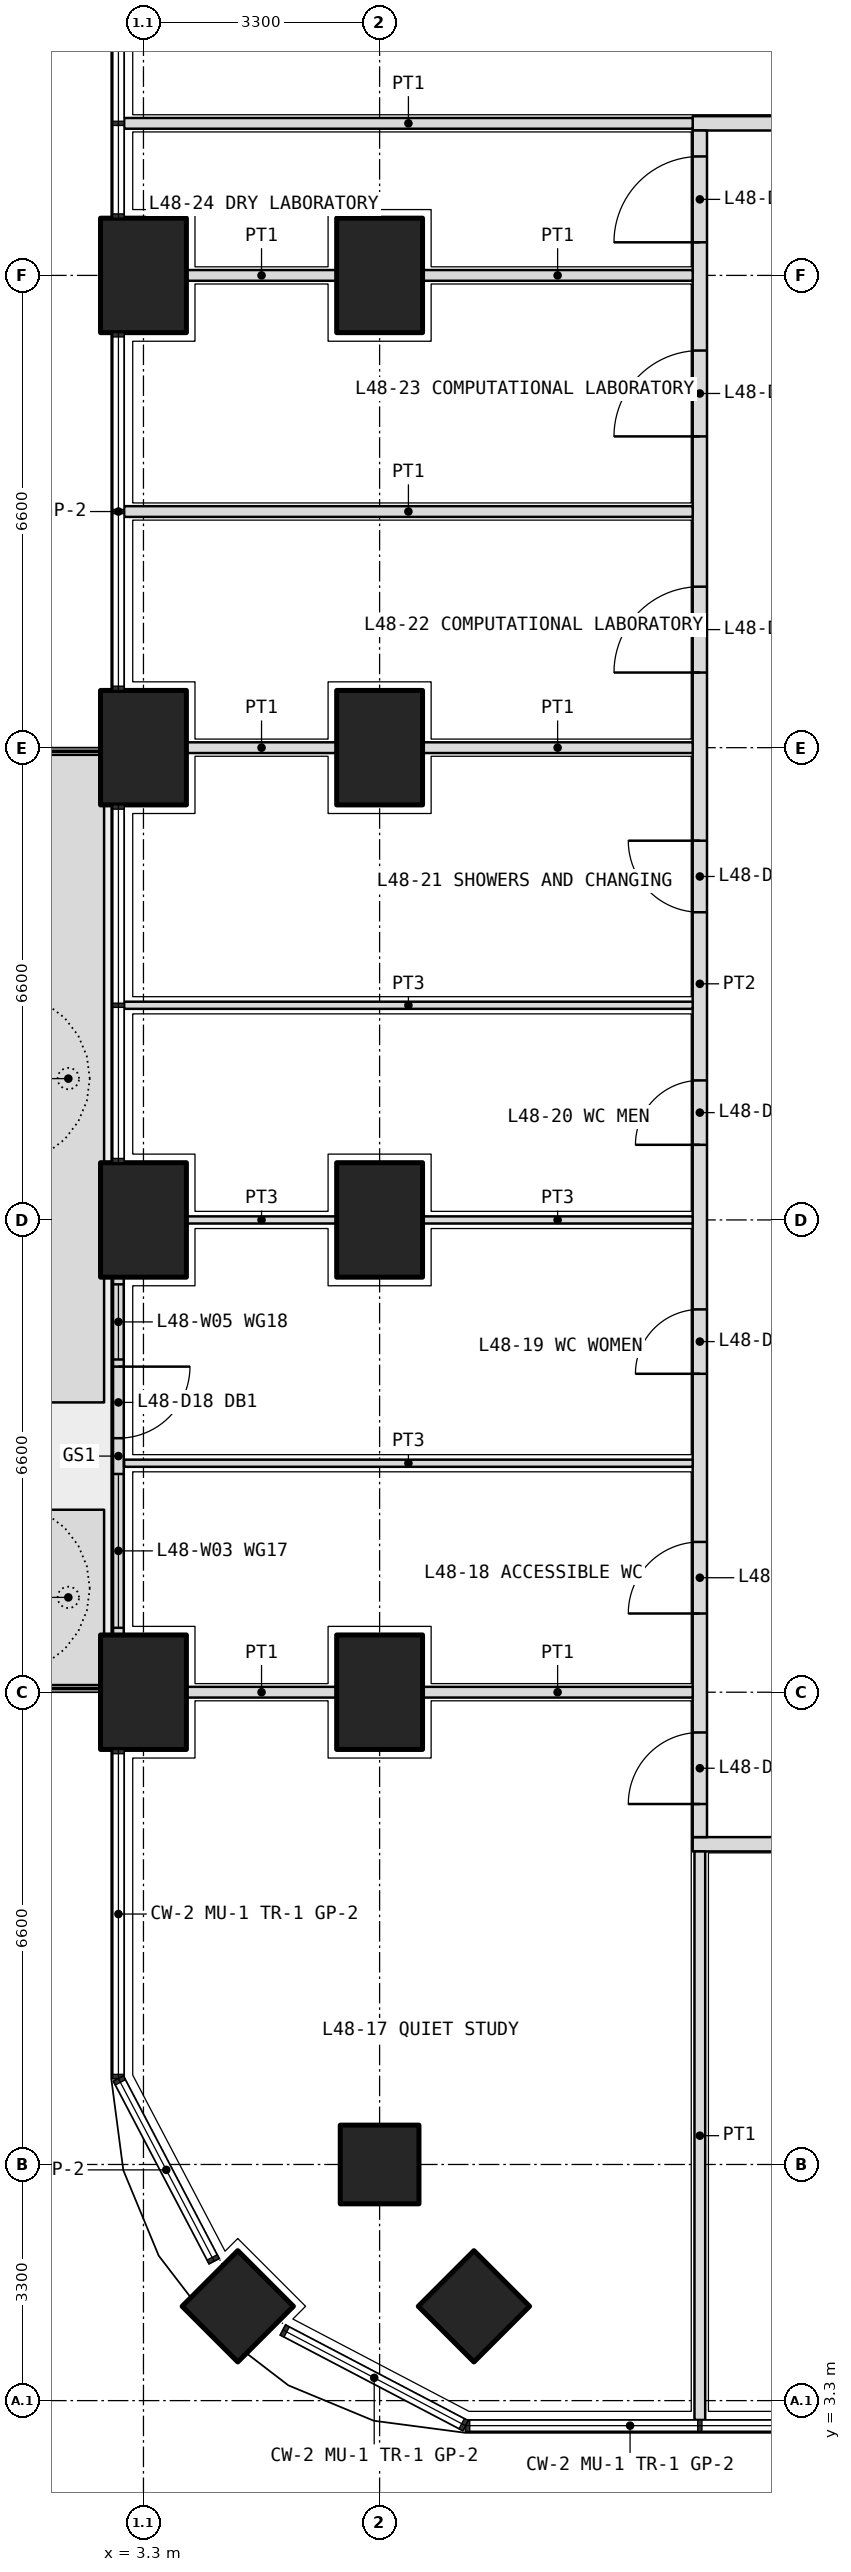
"""IFC4 building model, lengths in metres.
Left out: names, types, materials, properties, quantities, classifications, styles, units other than length and angle.
Written with IfcOpenShell. Run it as: python <this file> out.ifc"""

import sys

from ifc_helpers import new_model, si_unit, direction, frame, frame_2d, origin, origin_2d, place, context, subcontext, project, spatial, polyline, rectangle, outline, extrude, element, fill, save


model = new_model("IFC4")
c1 = context("Model", 3, precision=1e-05, world=origin(), true_north=direction((0.0, 1.0)))
c2 = subcontext(c1, "Body", "Model", "MODEL_VIEW")
j1 = project(units=[si_unit("LENGTHUNIT", "METRE"), si_unit("PLANEANGLEUNIT", "RADIAN")], contexts=[c1])
p1 = place(None, origin())
s1 = spatial("IfcSite", under=j1, at=p1, CompositionType="ELEMENT")
p2 = place(p1, origin())
s2 = spatial("IfcBuilding", under=s1, at=p2, CompositionType="ELEMENT")
p3 = place(p2, frame((0.0, 0.0, 210.3)))
s3 = spatial("IfcBuildingStorey", under=s2, at=p3, CompositionType="ELEMENT", Elevation=210.3)
p4 = place(p3, frame((4.618, 4.618, 0.0), z_axis=(0.0, 0.0, 1.0), x_axis=(0.707106781187, 0.707106781187, 0.0)))
e1 = element("IfcColumn", 1, at=p4, inside=s3, PredefinedType="COLUMN", context=c2, shape_type="SweptSolid", body=[
    extrude(rectangle(XDim=1.1, YDim=1.1, at=origin_2d()), origin(), (0.0, 0.0, 1.0), 4.2),
])
for number, where, z_axis, x_axis in (
    (2, (3.3, 13.2, 0.0), (0.0, 0.0, 1.0), (0.0, 1.0, 0.0)),
    (3, (3.3, 19.8, 0.0), (0.0, 0.0, 1.0), (0.0, 1.0, 0.0)),
    (4, (3.3, 26.4, 0.0), (0.0, 0.0, 1.0), (0.0, 1.0, 0.0)),
    (5, (3.3, 33.0, 0.0), (0.0, 0.0, 1.0), (0.0, 1.0, 0.0)),
):
    element("IfcColumn", number, at=place(p3, frame(where, z_axis=z_axis, x_axis=x_axis)), inside=s3, PredefinedType="COLUMN", context=c2, shape_type="SweptSolid", body=[
        extrude(rectangle(XDim=1.6, YDim=1.2, at=origin_2d()), origin(), (0.0, 0.0, 1.0), 4.2),
    ])
for number, where, z_axis, x_axis in (
    (6, (6.6, 6.6, 0.0), (0.0, 0.0, 1.0), (1.0, 0.0, 0.0)),
    (7, (7.918, 4.618, 0.0), (0.0, 0.0, 1.0), (0.707, 0.707, 0.0)),
):
    element("IfcColumn", number, at=place(p3, frame(where, z_axis=z_axis, x_axis=x_axis)), inside=s3, PredefinedType="COLUMN", context=c2, shape_type="SweptSolid", body=[
        extrude(rectangle(XDim=1.1, YDim=1.1, at=origin_2d()), origin(), (0.0, 0.0, 1.0), 4.2),
    ])
for number, where, z_axis, x_axis in (
    (8, (6.6, 13.2, 0.0), (0.0, 0.0, 1.0), (0.0, 1.0, 0.0)),
    (9, (6.6, 19.8, 0.0), (0.0, 0.0, 1.0), (0.0, 1.0, 0.0)),
    (10, (6.6, 26.4, 0.0), (0.0, 0.0, 1.0), (0.0, 1.0, 0.0)),
    (11, (6.6, 33.0, 0.0), (0.0, 0.0, 1.0), (0.0, 1.0, 0.0)),
):
    element("IfcColumn", number, at=place(p3, frame(where, z_axis=z_axis, x_axis=x_axis)), inside=s3, PredefinedType="COLUMN", context=c2, shape_type="SweptSolid", body=[
        extrude(rectangle(XDim=1.6, YDim=1.2, at=origin_2d()), origin(), (0.0, 0.0, 1.0), 4.2),
    ])
p5 = place(p3, origin())
e12 = element("IfcWall", 12, at=p5, inside=s3, PredefinedType="USERDEFINED", context=c2, shape_type="SweptSolid", body=[
    extrude(outline(polyline([(1.75, 13.3), (2.75, 13.3), (2.75, 15.75), (1.75, 15.75), (1.75, 13.3)]), holes=[polyline([(1.9, 13.45), (2.6, 13.45), (2.6, 15.6), (1.9, 15.6), (1.9, 13.45)])]), origin(), (0.0, 0.0, 1.0), 1.05),
])
p6 = place(p3, origin())
e13 = element("IfcWall", 13, at=p6, inside=s3, PredefinedType="USERDEFINED", context=c2, shape_type="SweptSolid", body=[
    extrude(outline(polyline([(1.75, 17.25), (2.75, 17.25), (2.75, 26.3), (1.75, 26.3), (1.75, 17.25)]), holes=[polyline([(1.9, 17.4), (2.6, 17.4), (2.6, 26.15), (1.9, 26.15), (1.9, 17.4)])]), origin(), (0.0, 0.0, 1.0), 1.05),
])
p7 = place(p3, frame((2.95, 19.0, 0.0), z_axis=(0.0, 0.0, 1.0), x_axis=(0.0, -1.0, 0.0)))
e14 = element("IfcWall", 14, at=p7, inside=s3, PredefinedType="SOLIDWALL", context=c2, shape_type="SweptSolid", body=[
    extrude(rectangle(XDim=5.0, YDim=0.15, at=frame_2d((2.5, 0.0))), origin(), (0.0, 0.0, 1.0), 2.6),
])
p8 = place(p7, frame((1.25, 0.0, 0.0)))
e15 = element("IfcOpeningElement", 15, at=p8, cuts=e14, PredefinedType="OPENING", context=c2, shape_type="SweptSolid", body=[
    extrude(rectangle(XDim=1.0, YDim=2.4, at=frame_2d((0.5, 1.2))), frame((0.0, 0.085, 0.0), z_axis=(0.0, -1.0, 0.0), x_axis=(1.0, 0.0, 0.0)), (0.0, 0.0, 1.0), 0.17),
])
p9 = place(p7, frame((0.1, 0.0, 0.1)))
e16 = element("IfcOpeningElement", 16, at=p9, cuts=e14, PredefinedType="OPENING", context=c2, shape_type="SweptSolid", body=[
    extrude(rectangle(XDim=1.05, YDim=2.2, at=frame_2d((0.525, 1.1))), frame((0.0, 0.085, 0.0), z_axis=(0.0, -1.0, 0.0), x_axis=(1.0, 0.0, 0.0)), (0.0, 0.0, 1.0), 0.17),
])
p10 = place(p7, frame((2.75, 0.0, 0.1)))
e17 = element("IfcOpeningElement", 17, at=p10, cuts=e14, PredefinedType="OPENING", context=c2, shape_type="SweptSolid", body=[
    extrude(rectangle(XDim=2.15, YDim=2.2, at=frame_2d((1.075, 1.1))), frame((0.0, 0.085, 0.0), z_axis=(0.0, -1.0, 0.0), x_axis=(1.0, 0.0, 0.0)), (0.0, 0.0, 1.0), 0.17),
])
p11 = place(p3, frame((10.975, 11.075, 0.0), z_axis=(0.0, 0.0, 1.0), x_axis=(1.0, 0.0, 0.0)))
e18 = element("IfcWall", 18, at=p11, inside=s3, PredefinedType="PARTITIONING", context=c2, shape_type="SweptSolid", body=[
    extrude(rectangle(XDim=30.85, YDim=0.2, at=frame_2d((15.425, 0.0))), origin(), (0.0, 0.0, 1.0), 2.85),
])
p12 = place(p11, frame((2.312, 0.0, 0.0)))
e19 = element("IfcOpeningElement", 19, at=p12, cuts=e18, PredefinedType="OPENING", context=c2, shape_type="SweptSolid", body=[
    extrude(rectangle(XDim=1.0, YDim=2.1, at=frame_2d((0.5, 1.05))), frame((0.0, 0.11, 0.0), z_axis=(0.0, -1.0, 0.0), x_axis=(1.0, 0.0, 0.0)), (0.0, 0.0, 1.0), 0.22),
])
p13 = place(p11, frame((9.975, 0.0, 0.0)))
e20 = element("IfcOpeningElement", 20, at=p13, cuts=e18, PredefinedType="OPENING", context=c2, shape_type="SweptSolid", body=[
    extrude(rectangle(XDim=1.0, YDim=2.1, at=frame_2d((0.5, 1.05))), frame((0.0, 0.11, 0.0), z_axis=(0.0, -1.0, 0.0), x_axis=(1.0, 0.0, 0.0)), (0.0, 0.0, 1.0), 0.22),
])
p14 = place(p11, frame((16.575, 0.0, 0.0)))
e21 = element("IfcOpeningElement", 21, at=p14, cuts=e18, PredefinedType="OPENING", context=c2, shape_type="SweptSolid", body=[
    extrude(rectangle(XDim=1.0, YDim=2.1, at=frame_2d((0.5, 1.05))), frame((0.0, 0.11, 0.0), z_axis=(0.0, -1.0, 0.0), x_axis=(1.0, 0.0, 0.0)), (0.0, 0.0, 1.0), 0.22),
])
p15 = place(p11, frame((23.175, 0.0, 0.0)))
e22 = element("IfcOpeningElement", 22, at=p15, cuts=e18, PredefinedType="OPENING", context=c2, shape_type="SweptSolid", body=[
    extrude(rectangle(XDim=1.0, YDim=2.1, at=frame_2d((0.5, 1.05))), frame((0.0, 0.11, 0.0), z_axis=(0.0, -1.0, 0.0), x_axis=(1.0, 0.0, 0.0)), (0.0, 0.0, 1.0), 0.22),
])
p16 = place(p11, frame((29.188, 0.0, 0.0)))
e23 = element("IfcOpeningElement", 23, at=p16, cuts=e18, PredefinedType="OPENING", context=c2, shape_type="SweptSolid", body=[
    extrude(rectangle(XDim=1.0, YDim=2.1, at=frame_2d((0.5, 1.05))), frame((0.0, 0.11, 0.0), z_axis=(0.0, -1.0, 0.0), x_axis=(1.0, 0.0, 0.0)), (0.0, 0.0, 1.0), 0.22),
])
p17 = place(p3, frame((10.975, 35.125, 0.0), z_axis=(0.0, 0.0, 1.0), x_axis=(1.0, 0.0, 0.0)))
e24 = element("IfcWall", 24, at=p17, inside=s3, PredefinedType="PARTITIONING", context=c2, shape_type="SweptSolid", body=[
    extrude(rectangle(XDim=5.525, YDim=0.2, at=frame_2d((2.762, 0.0))), origin(), (0.0, 0.0, 1.0), 2.85),
])
p18 = place(p17, frame((2.312, 0.0, 0.0)))
e25 = element("IfcOpeningElement", 25, at=p18, cuts=e24, PredefinedType="OPENING", context=c2, shape_type="SweptSolid", body=[
    extrude(rectangle(XDim=1.0, YDim=2.1, at=frame_2d((0.5, 1.05))), frame((0.0, 0.11, 0.0), z_axis=(0.0, -1.0, 0.0), x_axis=(1.0, 0.0, 0.0)), (0.0, 0.0, 1.0), 0.22),
])
p19 = place(p3, frame((11.075, 11.175, 0.0), z_axis=(0.0, 0.0, 1.0), x_axis=(0.0, 1.0, 0.0)))
e26 = element("IfcWall", 26, at=p19, inside=s3, PredefinedType="PARTITIONING", context=c2, shape_type="SweptSolid", body=[
    extrude(rectangle(XDim=23.85, YDim=0.2, at=frame_2d((11.925, 0.0))), origin(), (0.0, 0.0, 1.0), 2.85),
])
p20 = place(p19, frame((0.462, 0.0, 0.0)))
e27 = element("IfcOpeningElement", 27, at=p20, cuts=e26, PredefinedType="OPENING", context=c2, shape_type="SweptSolid", body=[
    extrude(rectangle(XDim=1.0, YDim=2.1, at=frame_2d((0.5, 1.05))), frame((0.0, 0.11, 0.0), z_axis=(0.0, -1.0, 0.0), x_axis=(1.0, 0.0, 0.0)), (0.0, 0.0, 1.0), 0.22),
])
p21 = place(p19, frame((3.125, 0.0, 0.0)))
e28 = element("IfcOpeningElement", 28, at=p21, cuts=e26, PredefinedType="OPENING", context=c2, shape_type="SweptSolid", body=[
    extrude(rectangle(XDim=1.0, YDim=2.1, at=frame_2d((0.5, 1.05))), frame((0.0, 0.11, 0.0), z_axis=(0.0, -1.0, 0.0), x_axis=(1.0, 0.0, 0.0)), (0.0, 0.0, 1.0), 0.22),
])
p22 = place(p19, frame((6.475, 0.0, 0.0)))
e29 = element("IfcOpeningElement", 29, at=p22, cuts=e26, PredefinedType="OPENING", context=c2, shape_type="SweptSolid", body=[
    extrude(rectangle(XDim=0.9, YDim=2.1, at=frame_2d((0.45, 1.05))), frame((0.0, 0.11, 0.0), z_axis=(0.0, -1.0, 0.0), x_axis=(1.0, 0.0, 0.0)), (0.0, 0.0, 1.0), 0.22),
])
p23 = place(p19, frame((9.675, 0.0, 0.0)))
e30 = element("IfcOpeningElement", 30, at=p23, cuts=e26, PredefinedType="OPENING", context=c2, shape_type="SweptSolid", body=[
    extrude(rectangle(XDim=0.9, YDim=2.1, at=frame_2d((0.45, 1.05))), frame((0.0, 0.11, 0.0), z_axis=(0.0, -1.0, 0.0), x_axis=(1.0, 0.0, 0.0)), (0.0, 0.0, 1.0), 0.22),
])
p24 = place(p19, frame((12.925, 0.0, 0.0)))
e31 = element("IfcOpeningElement", 31, at=p24, cuts=e26, PredefinedType="OPENING", context=c2, shape_type="SweptSolid", body=[
    extrude(rectangle(XDim=1.0, YDim=2.1, at=frame_2d((0.5, 1.05))), frame((0.0, 0.11, 0.0), z_axis=(0.0, -1.0, 0.0), x_axis=(1.0, 0.0, 0.0)), (0.0, 0.0, 1.0), 0.22),
])
p25 = place(p19, frame((16.275, 0.0, 0.0)))
e32 = element("IfcOpeningElement", 32, at=p25, cuts=e26, PredefinedType="OPENING", context=c2, shape_type="SweptSolid", body=[
    extrude(rectangle(XDim=1.2, YDim=2.1, at=frame_2d((0.6, 1.05))), frame((0.0, 0.11, 0.0), z_axis=(0.0, -1.0, 0.0), x_axis=(1.0, 0.0, 0.0)), (0.0, 0.0, 1.0), 0.22),
])
p26 = place(p19, frame((19.575, 0.0, 0.0)))
e33 = element("IfcOpeningElement", 33, at=p26, cuts=e26, PredefinedType="OPENING", context=c2, shape_type="SweptSolid", body=[
    extrude(rectangle(XDim=1.2, YDim=2.1, at=frame_2d((0.6, 1.05))), frame((0.0, 0.11, 0.0), z_axis=(0.0, -1.0, 0.0), x_axis=(1.0, 0.0, 0.0)), (0.0, 0.0, 1.0), 0.22),
])
p27 = place(p19, frame((22.288, 0.0, 0.0)))
e34 = element("IfcOpeningElement", 34, at=p27, cuts=e26, PredefinedType="OPENING", context=c2, shape_type="SweptSolid", body=[
    extrude(rectangle(XDim=1.2, YDim=2.1, at=frame_2d((0.6, 1.05))), frame((0.0, 0.11, 0.0), z_axis=(0.0, -1.0, 0.0), x_axis=(1.0, 0.0, 0.0)), (0.0, 0.0, 1.0), 0.22),
])
for number, where, z_axis, x_axis in (
    (35, (11.075, 3.03, 0.0), (0.0, 0.0, 1.0), (0.0, 1.0, 0.0)),
    (36, (3.03, 35.125, 0.0), (0.0, 0.0, 1.0), (1.0, 0.0, 0.0)),
):
    element("IfcWall", number, at=place(p3, frame(where, z_axis=z_axis, x_axis=x_axis)), inside=s3, PredefinedType="PARTITIONING", context=c2, shape_type="SweptSolid", body=[
        extrude(rectangle(XDim=7.945, YDim=0.15, at=frame_2d((3.973, 0.0))), origin(), (0.0, 0.0, 1.0), 2.6),
    ])
p28 = place(p3, frame((3.03, 16.4, 0.0), z_axis=(0.0, 0.0, 1.0), x_axis=(1.0, 0.0, 0.0)))
e37 = element("IfcWall", 37, at=p28, inside=s3, PredefinedType="PARTITIONING", context=c2, shape_type="SweptSolid", body=[
    extrude(rectangle(XDim=7.945, YDim=0.1, at=frame_2d((3.973, 0.0))), origin(), (0.0, 0.0, 1.0), 2.6),
])
p29 = place(p3, frame((3.9, 19.8, 0.0), z_axis=(0.0, 0.0, 1.0), x_axis=(1.0, 0.0, 0.0)))
e38 = element("IfcWall", 38, at=p29, inside=s3, PredefinedType="PARTITIONING", context=c2, shape_type="SweptSolid", body=[
    extrude(rectangle(XDim=2.1, YDim=0.1, at=frame_2d((1.05, 0.0))), origin(), (0.0, 0.0, 1.0), 2.85),
])
p30 = place(p3, frame((7.2, 19.8, 0.0), z_axis=(0.0, 0.0, 1.0), x_axis=(1.0, 0.0, 0.0)))
e39 = element("IfcWall", 39, at=p30, inside=s3, PredefinedType="PARTITIONING", context=c2, shape_type="SweptSolid", body=[
    extrude(rectangle(XDim=3.775, YDim=0.1, at=frame_2d((1.888, 0.0))), origin(), (0.0, 0.0, 1.0), 2.85),
])
p31 = place(p3, frame((3.03, 22.8, 0.0), z_axis=(0.0, 0.0, 1.0), x_axis=(1.0, 0.0, 0.0)))
e40 = element("IfcWall", 40, at=p31, inside=s3, PredefinedType="PARTITIONING", context=c2, shape_type="SweptSolid", body=[
    extrude(rectangle(XDim=7.945, YDim=0.1, at=frame_2d((3.973, 0.0))), origin(), (0.0, 0.0, 1.0), 2.6),
])
p32 = place(p3, frame((3.9, 13.2, 0.0), z_axis=(0.0, 0.0, 1.0), x_axis=(1.0, 0.0, 0.0)))
e41 = element("IfcWall", 41, at=p32, inside=s3, PredefinedType="PARTITIONING", context=c2, shape_type="SweptSolid", body=[
    extrude(rectangle(XDim=2.1, YDim=0.15, at=frame_2d((1.05, 0.0))), origin(), (0.0, 0.0, 1.0), 2.85),
])
p33 = place(p3, frame((7.2, 13.2, 0.0), z_axis=(0.0, 0.0, 1.0), x_axis=(1.0, 0.0, 0.0)))
e42 = element("IfcWall", 42, at=p33, inside=s3, PredefinedType="PARTITIONING", context=c2, shape_type="SweptSolid", body=[
    extrude(rectangle(XDim=3.775, YDim=0.15, at=frame_2d((1.888, 0.0))), origin(), (0.0, 0.0, 1.0), 2.85),
])
p34 = place(p3, frame((3.9, 26.4, 0.0), z_axis=(0.0, 0.0, 1.0), x_axis=(1.0, 0.0, 0.0)))
e43 = element("IfcWall", 43, at=p34, inside=s3, PredefinedType="PARTITIONING", context=c2, shape_type="SweptSolid", body=[
    extrude(rectangle(XDim=2.1, YDim=0.15, at=frame_2d((1.05, 0.0))), origin(), (0.0, 0.0, 1.0), 2.85),
])
p35 = place(p3, frame((7.2, 26.4, 0.0), z_axis=(0.0, 0.0, 1.0), x_axis=(1.0, 0.0, 0.0)))
e44 = element("IfcWall", 44, at=p35, inside=s3, PredefinedType="PARTITIONING", context=c2, shape_type="SweptSolid", body=[
    extrude(rectangle(XDim=3.775, YDim=0.15, at=frame_2d((1.888, 0.0))), origin(), (0.0, 0.0, 1.0), 2.85),
])
p36 = place(p3, frame((3.03, 29.7, 0.0), z_axis=(0.0, 0.0, 1.0), x_axis=(1.0, 0.0, 0.0)))
e45 = element("IfcWall", 45, at=p36, inside=s3, PredefinedType="PARTITIONING", context=c2, shape_type="SweptSolid", body=[
    extrude(rectangle(XDim=7.945, YDim=0.15, at=frame_2d((3.973, 0.0))), origin(), (0.0, 0.0, 1.0), 2.6),
])
p37 = place(p3, frame((3.9, 33.0, 0.0), z_axis=(0.0, 0.0, 1.0), x_axis=(1.0, 0.0, 0.0)))
e46 = element("IfcWall", 46, at=p37, inside=s3, PredefinedType="PARTITIONING", context=c2, shape_type="SweptSolid", body=[
    extrude(rectangle(XDim=2.1, YDim=0.15, at=frame_2d((1.05, 0.0))), origin(), (0.0, 0.0, 1.0), 2.85),
])
p38 = place(p3, frame((7.2, 33.0, 0.0), z_axis=(0.0, 0.0, 1.0), x_axis=(1.0, 0.0, 0.0)))
e47 = element("IfcWall", 47, at=p38, inside=s3, PredefinedType="PARTITIONING", context=c2, shape_type="SweptSolid", body=[
    extrude(rectangle(XDim=3.775, YDim=0.15, at=frame_2d((1.888, 0.0))), origin(), (0.0, 0.0, 1.0), 2.85),
])
p39 = place(p8, origin())
e48 = element("IfcDoor", 48, at=p39, inside=s3, OperationType="SINGLE_SWING_LEFT", PredefinedType="DOOR", context=c2, shape_type="SweptSolid", body=[
    extrude(rectangle(XDim=1.0, YDim=2.4, at=frame_2d((0.5, 1.2))), frame((0.0, 0.025, 0.0), z_axis=(0.0, -1.0, 0.0), x_axis=(1.0, 0.0, 0.0)), (0.0, 0.0, 1.0), 0.05),
])
fill(e15, e48)
p40 = place(p9, origin())
e49 = element("IfcWindow", 49, at=p40, inside=s3, PartitioningType="SINGLE_PANEL", PredefinedType="WINDOW", context=c2, shape_type="SweptSolid", body=[
    extrude(rectangle(XDim=1.05, YDim=2.2, at=frame_2d((0.525, 1.1))), frame((0.0, 0.03, 0.0), z_axis=(0.0, -1.0, 0.0), x_axis=(1.0, 0.0, 0.0)), (0.0, 0.0, 1.0), 0.06),
])
fill(e16, e49)
p41 = place(p10, origin())
e50 = element("IfcWindow", 50, at=p41, inside=s3, PartitioningType="SINGLE_PANEL", PredefinedType="WINDOW", context=c2, shape_type="SweptSolid", body=[
    extrude(rectangle(XDim=2.15, YDim=2.2, at=frame_2d((1.075, 1.1))), frame((0.0, 0.03, 0.0), z_axis=(0.0, -1.0, 0.0), x_axis=(1.0, 0.0, 0.0)), (0.0, 0.0, 1.0), 0.06),
])
fill(e17, e50)
p42 = place(p20, origin())
e51 = element("IfcDoor", 51, at=p42, inside=s3, OperationType="SINGLE_SWING_LEFT", PredefinedType="DOOR", context=c2, shape_type="SweptSolid", body=[
    extrude(rectangle(XDim=1.0, YDim=2.1, at=frame_2d((0.5, 1.05))), frame((0.0, 0.025, 0.0), z_axis=(0.0, -1.0, 0.0), x_axis=(1.0, 0.0, 0.0)), (0.0, 0.0, 1.0), 0.05),
])
fill(e27, e51)
p43 = place(p21, origin())
e52 = element("IfcDoor", 52, at=p43, inside=s3, OperationType="SINGLE_SWING_LEFT", PredefinedType="DOOR", context=c2, shape_type="SweptSolid", body=[
    extrude(rectangle(XDim=1.0, YDim=2.1, at=frame_2d((0.5, 1.05))), frame((0.0, 0.025, 0.0), z_axis=(0.0, -1.0, 0.0), x_axis=(1.0, 0.0, 0.0)), (0.0, 0.0, 1.0), 0.05),
])
fill(e28, e52)
p44 = place(p22, origin())
e53 = element("IfcDoor", 53, at=p44, inside=s3, OperationType="SINGLE_SWING_LEFT", PredefinedType="DOOR", context=c2, shape_type="SweptSolid", body=[
    extrude(rectangle(XDim=0.9, YDim=2.1, at=frame_2d((0.45, 1.05))), frame((0.0, 0.025, 0.0), z_axis=(0.0, -1.0, 0.0), x_axis=(1.0, 0.0, 0.0)), (0.0, 0.0, 1.0), 0.05),
])
fill(e29, e53)
p45 = place(p23, origin())
e54 = element("IfcDoor", 54, at=p45, inside=s3, OperationType="SINGLE_SWING_LEFT", PredefinedType="DOOR", context=c2, shape_type="SweptSolid", body=[
    extrude(rectangle(XDim=0.9, YDim=2.1, at=frame_2d((0.45, 1.05))), frame((0.0, 0.025, 0.0), z_axis=(0.0, -1.0, 0.0), x_axis=(1.0, 0.0, 0.0)), (0.0, 0.0, 1.0), 0.05),
])
fill(e30, e54)
p46 = place(p24, origin())
e55 = element("IfcDoor", 55, at=p46, inside=s3, OperationType="SINGLE_SWING_RIGHT", PredefinedType="DOOR", context=c2, shape_type="SweptSolid", body=[
    extrude(rectangle(XDim=1.0, YDim=2.1, at=frame_2d((0.5, 1.05))), frame((0.0, 0.025, 0.0), z_axis=(0.0, -1.0, 0.0), x_axis=(1.0, 0.0, 0.0)), (0.0, 0.0, 1.0), 0.05),
])
fill(e31, e55)
p47 = place(p25, origin())
e56 = element("IfcDoor", 56, at=p47, inside=s3, OperationType="DOUBLE_DOOR_SINGLE_SWING", PredefinedType="DOOR", context=c2, shape_type="SweptSolid", body=[
    extrude(rectangle(XDim=1.2, YDim=2.1, at=frame_2d((0.6, 1.05))), frame((0.0, 0.025, 0.0), z_axis=(0.0, -1.0, 0.0), x_axis=(1.0, 0.0, 0.0)), (0.0, 0.0, 1.0), 0.05),
])
fill(e32, e56)
p48 = place(p26, origin())
e57 = element("IfcDoor", 57, at=p48, inside=s3, OperationType="DOUBLE_DOOR_SINGLE_SWING", PredefinedType="DOOR", context=c2, shape_type="SweptSolid", body=[
    extrude(rectangle(XDim=1.2, YDim=2.1, at=frame_2d((0.6, 1.05))), frame((0.0, 0.025, 0.0), z_axis=(0.0, -1.0, 0.0), x_axis=(1.0, 0.0, 0.0)), (0.0, 0.0, 1.0), 0.05),
])
fill(e33, e57)
p49 = place(p27, origin())
e58 = element("IfcDoor", 58, at=p49, inside=s3, OperationType="DOUBLE_DOOR_SINGLE_SWING", PredefinedType="DOOR", context=c2, shape_type="SweptSolid", body=[
    extrude(rectangle(XDim=1.2, YDim=2.1, at=frame_2d((0.6, 1.05))), frame((0.0, 0.025, 0.0), z_axis=(0.0, -1.0, 0.0), x_axis=(1.0, 0.0, 0.0)), (0.0, 0.0, 1.0), 0.05),
])
fill(e34, e58)
save(model, sys.argv[1])
